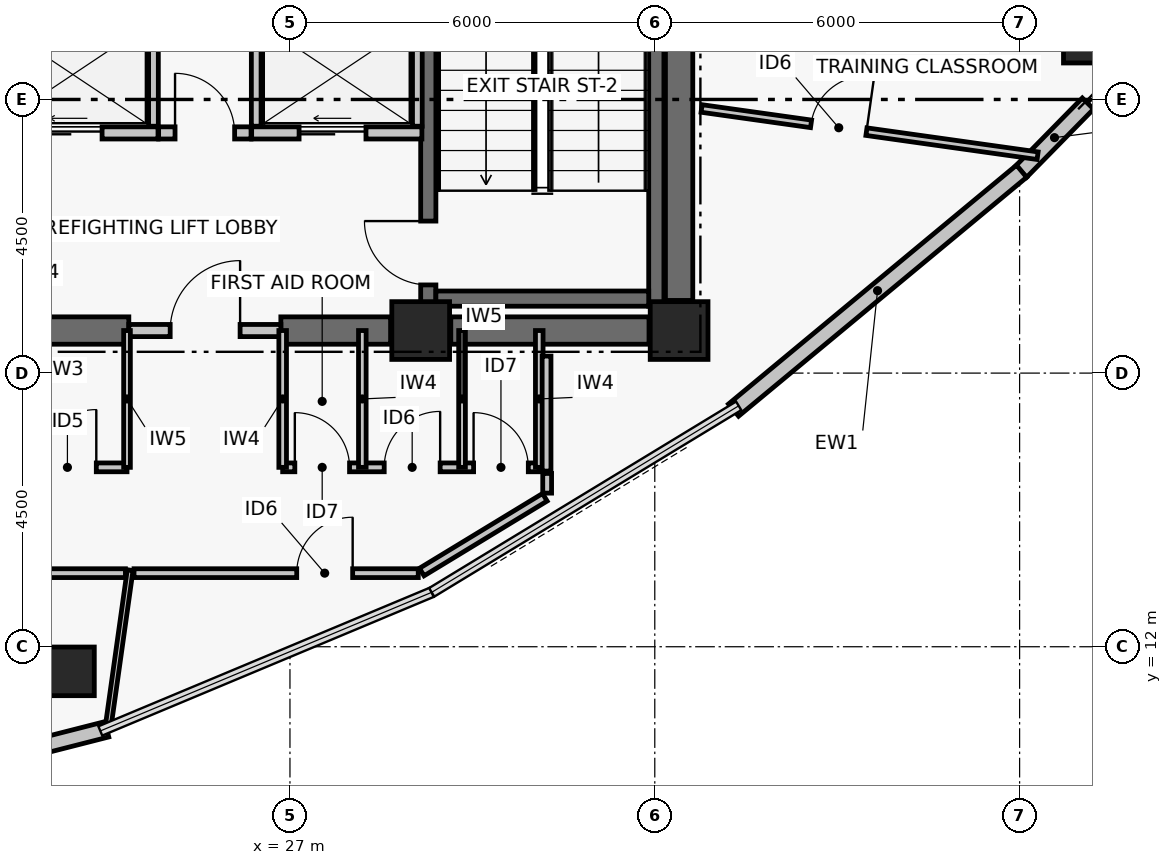
"""IFC4 building model, lengths in metres.
Left out: names, types, materials, properties, quantities, classifications, styles, units other than length and angle.
Written with IfcOpenShell. Run it as: python <this file> out.ifc"""

import sys

from ifc_helpers import new_model, si_unit, direction, frame, frame_2d, origin, origin_2d, place, context, subcontext, project, spatial, rectangle, hollow_rectangle, extrude, element, fill, save


model = new_model("IFC4")
c1 = context("Model", 3, precision=1e-05, world=origin(), true_north=direction((0.0, 1.0)))
c2 = subcontext(c1, "Body", "Model", "MODEL_VIEW")
j1 = project(units=[si_unit("LENGTHUNIT", "METRE"), si_unit("PLANEANGLEUNIT", "RADIAN")], contexts=[c1])
p1 = place(None, origin())
s1 = spatial("IfcSite", under=j1, at=p1, CompositionType="ELEMENT")
p2 = place(p1, origin())
s2 = spatial("IfcBuilding", under=s1, at=p2, CompositionType="ELEMENT")
p3 = place(p2, frame((0.0, 0.0, 284.34)))
s3 = spatial("IfcBuildingStorey", under=s2, at=p3, CompositionType="ELEMENT", Elevation=284.34)
for number, where, z_axis, x_axis in (
    (1, (29.15, 17.2, 0.0), (0.0, 0.0, 1.0), (1.0, 0.0, 0.0)),
    (2, (33.4, 17.2, 0.0), (0.0, 0.0, 1.0), (1.0, 0.0, 0.0)),
):
    element("IfcColumn", number, at=place(p3, frame(where, z_axis=z_axis, x_axis=x_axis)), inside=s3, PredefinedType="COLUMN", context=c2, shape_type="SweptSolid", body=[
        extrude(rectangle(XDim=0.95, YDim=0.95, at=origin_2d()), origin(), (0.0, 0.0, 1.0), 3.72),
    ])
p4 = place(p3, frame((22.545, 17.2, 0.0), z_axis=(0.0, 0.0, 1.0), x_axis=(1.0, 0.0, 0.0)))
e3 = element("IfcWall", 3, at=p4, inside=s3, PredefinedType="SHEAR", context=c2, shape_type="SweptSolid", body=[
    extrude(rectangle(XDim=1.805, YDim=0.45, at=frame_2d((0.903, 0.0))), origin(), (0.0, 0.0, 1.0), 3.5),
])
p5 = place(p3, frame((26.85, 17.2, 0.0), z_axis=(0.0, 0.0, 1.0), x_axis=(1.0, 0.0, 0.0)))
e4 = element("IfcWall", 4, at=p5, inside=s3, PredefinedType="SHEAR", context=c2, shape_type="SweptSolid", body=[
    extrude(rectangle(XDim=1.805, YDim=0.45, at=frame_2d((0.902, 0.0))), origin(), (0.0, 0.0, 1.0), 3.5),
])
p6 = place(p3, frame((29.645, 17.2, 0.0), z_axis=(0.0, 0.0, 1.0), x_axis=(1.0, 0.0, 0.0)))
e5 = element("IfcWall", 5, at=p6, inside=s3, PredefinedType="SHEAR", context=c2, shape_type="SweptSolid", body=[
    extrude(rectangle(XDim=3.26, YDim=0.45, at=frame_2d((1.63, 0.0))), origin(), (0.0, 0.0, 1.0), 3.5),
])
p7 = place(p3, frame((33.4, 17.695, 0.0), z_axis=(0.0, 0.0, 1.0), x_axis=(0.0, 1.0, 0.0)))
e6 = element("IfcWall", 6, at=p7, inside=s3, PredefinedType="SHEAR", context=c2, shape_type="SweptSolid", body=[
    extrude(rectangle(XDim=8.61, YDim=0.45, at=frame_2d((4.305, 0.0))), origin(), (0.0, 0.0, 1.0), 3.5),
])
p8 = place(p3, frame((29.275, 17.6, 0.0), z_axis=(0.0, 0.0, 1.0), x_axis=(0.0, 1.0, 0.0)))
e7 = element("IfcWall", 7, at=p8, inside=s3, PredefinedType="SHEAR", context=c2, shape_type="SweptSolid", body=[
    extrude(rectangle(XDim=8.8, YDim=0.25, at=frame_2d((4.4, 0.0))), origin(), (0.0, 0.0, 1.0), 3.5),
])
p9 = place(p8, frame((0.35, 0.0, 0.0)))
e8 = element("IfcOpeningElement", 8, at=p9, cuts=e7, PredefinedType="OPENING", context=c2, shape_type="SweptSolid", body=[
    extrude(rectangle(XDim=1.05, YDim=2.08, at=frame_2d((0.525, 1.04))), frame((0.0, 0.135, 0.0), z_axis=(0.0, -1.0, 0.0), x_axis=(1.0, 0.0, 0.0)), (0.0, 0.0, 1.0), 0.27),
])
p10 = place(p3, frame((33.025, 17.6, 0.0), z_axis=(0.0, 0.0, 1.0), x_axis=(0.0, 1.0, 0.0)))
e9 = element("IfcWall", 9, at=p10, inside=s3, PredefinedType="SHEAR", context=c2, shape_type="SweptSolid", body=[
    extrude(rectangle(XDim=8.8, YDim=0.25, at=frame_2d((4.4, 0.0))), origin(), (0.0, 0.0, 1.0), 3.5),
])
p11 = place(p3, frame((29.4, 17.725, 0.0), z_axis=(0.0, 0.0, 1.0), x_axis=(1.0, 0.0, 0.0)))
e10 = element("IfcWall", 10, at=p11, inside=s3, PredefinedType="SHEAR", context=c2, shape_type="SweptSolid", body=[
    extrude(rectangle(XDim=3.5, YDim=0.25, at=frame_2d((1.75, 0.0))), origin(), (0.0, 0.0, 1.0), 3.5),
])
for number, where, z_axis, x_axis in (
    (11, (40.122, 22.0, 0.0), (0.0, 0.0, 1.0), (1.0, 0.0, 0.0)),
    (12, (23.382, 11.595, 0.0), (0.0, 0.0, 1.0), (1.0, 0.0, 0.0)),
):
    element("IfcColumn", number, at=place(p3, frame(where, z_axis=z_axis, x_axis=x_axis)), inside=s3, PredefinedType="COLUMN", context=c2, shape_type="SweptSolid", body=[
        extrude(hollow_rectangle(XDim=0.8, YDim=0.8, WallThickness=0.035, at=origin_2d()), origin(), (0.0, 0.0, 1.0), 3.72),
    ])
p12 = place(p3, frame((40.124, 20.933, 0.0), z_axis=(0.0, 0.0, 1.0), x_axis=(-0.700470648387, -0.71368121087, 0.0)))
e13 = element("IfcWall", 13, at=p12, inside=s3, PredefinedType="PARTITIONING", context=c2, shape_type="SweptSolid", body=[
    extrude(rectangle(XDim=1.571, YDim=0.26, at=frame_2d((0.785, 0.0))), origin(), (0.0, 0.0, 1.0), 3.5),
])
p13 = place(p3, frame((23.988, 10.642, 0.0), z_axis=(0.0, 0.0, 1.0), x_axis=(-0.968988278672, -0.247106689096, 0.0)))
e14 = element("IfcWall", 14, at=p13, inside=s3, PredefinedType="PARTITIONING", context=c2, shape_type="SweptSolid", body=[
    extrude(rectangle(XDim=6.154, YDim=0.26, at=frame_2d((3.077, 0.0))), origin(), (0.0, 0.0, 1.0), 3.5),
])
p14 = place(p3, frame((39.032, 19.82, 0.0), z_axis=(0.0, 0.0, 1.0), x_axis=(-0.769779830138, -0.638309496337, 0.0)))
e15 = element("IfcWall", 15, at=p14, inside=s3, PredefinedType="PARTITIONING", context=c2, shape_type="SweptSolid", body=[
    extrude(rectangle(XDim=6.154, YDim=0.26, at=frame_2d((3.077, 0.0))), origin(), (0.0, 0.0, 1.0), 3.5),
])
p15 = place(p3, frame((24.35, 17.2, 0.0), z_axis=(0.0, 0.0, 1.0), x_axis=(1.0, 0.0, 0.0)))
e16 = element("IfcWall", 16, at=p15, inside=s3, PredefinedType="PARTITIONING", context=c2, shape_type="SweptSolid", body=[
    extrude(rectangle(XDim=2.5, YDim=0.2, at=frame_2d((1.25, 0.0))), origin(), (0.0, 0.0, 1.0), 2.63),
])
p16 = place(p15, frame((0.68, 0.0, 0.0)))
e17 = element("IfcOpeningElement", 17, at=p16, cuts=e16, PredefinedType="OPENING", context=c2, shape_type="SweptSolid", body=[
    extrude(rectangle(XDim=1.15, YDim=2.08, at=frame_2d((0.575, 1.04))), frame((0.0, 0.11, 0.0), z_axis=(0.0, -1.0, 0.0), x_axis=(1.0, 0.0, 0.0)), (0.0, 0.0, 1.0), 0.22),
])
p17 = place(p3, frame((24.84, 20.45, 0.0), z_axis=(0.0, 0.0, 1.0), x_axis=(1.0, 0.0, 0.0)))
e18 = element("IfcWall", 18, at=p17, inside=s3, PredefinedType="PARTITIONING", context=c2, shape_type="SweptSolid", body=[
    extrude(rectangle(XDim=1.52, YDim=0.2, at=frame_2d((0.76, 0.0))), origin(), (0.0, 0.0, 1.0), 3.5),
])
p18 = place(p17, frame((0.27, 0.0, 0.0)))
e19 = element("IfcOpeningElement", 19, at=p18, cuts=e18, PredefinedType="OPENING", context=c2, shape_type="SweptSolid", body=[
    extrude(rectangle(XDim=0.98, YDim=2.06, at=frame_2d((0.49, 1.03))), frame((0.0, 0.11, 0.0), z_axis=(0.0, -1.0, 0.0), x_axis=(1.0, 0.0, 0.0)), (0.0, 0.0, 1.0), 0.22),
])
p19 = place(p3, frame((22.03, 20.45, 0.0), z_axis=(0.0, 0.0, 1.0), x_axis=(1.0, 0.0, 0.0)))
e20 = element("IfcWall", 20, at=p19, inside=s3, PredefinedType="PARTITIONING", context=c2, shape_type="SweptSolid", body=[
    extrude(rectangle(XDim=2.8, YDim=0.2, at=frame_2d((1.4, 0.0))), origin(), (0.0, 0.0, 1.0), 3.5),
])
p20 = place(p19, frame((0.78, 0.0, 0.0)))
e21 = element("IfcOpeningElement", 21, at=p20, cuts=e20, PredefinedType="OPENING", context=c2, shape_type="SweptSolid", body=[
    extrude(rectangle(XDim=1.1, YDim=2.08, at=frame_2d((0.55, 1.04))), frame((0.0, 0.11, 0.0), z_axis=(0.0, -1.0, 0.0), x_axis=(1.0, 0.0, 0.0)), (0.0, 0.0, 1.0), 0.22),
])
p21 = place(p3, frame((26.37, 20.45, 0.0), z_axis=(0.0, 0.0, 1.0), x_axis=(1.0, 0.0, 0.0)))
e22 = element("IfcWall", 22, at=p21, inside=s3, PredefinedType="PARTITIONING", context=c2, shape_type="SweptSolid", body=[
    extrude(rectangle(XDim=2.8, YDim=0.2, at=frame_2d((1.4, 0.0))), origin(), (0.0, 0.0, 1.0), 3.5),
])
p22 = place(p21, frame((0.78, 0.0, 0.0)))
e23 = element("IfcOpeningElement", 23, at=p22, cuts=e22, PredefinedType="OPENING", context=c2, shape_type="SweptSolid", body=[
    extrude(rectangle(XDim=1.1, YDim=2.08, at=frame_2d((0.55, 1.04))), frame((0.0, 0.11, 0.0), z_axis=(0.0, -1.0, 0.0), x_axis=(1.0, 0.0, 0.0)), (0.0, 0.0, 1.0), 0.22),
])
p23 = place(p3, frame((24.755, 20.56, 0.0), z_axis=(0.0, 0.0, 1.0), x_axis=(0.0, 1.0, 0.0)))
e24 = element("IfcWall", 24, at=p23, inside=s3, PredefinedType="PARTITIONING", context=c2, shape_type="SweptSolid", body=[
    extrude(rectangle(XDim=1.71, YDim=0.16, at=frame_2d((0.855, 0.0))), origin(), (0.0, 0.0, 1.0), 3.5),
])
p24 = place(p3, frame((29.095, 20.56, 0.0), z_axis=(0.0, 0.0, 1.0), x_axis=(0.0, 1.0, 0.0)))
e25 = element("IfcWall", 25, at=p24, inside=s3, PredefinedType="PARTITIONING", context=c2, shape_type="SweptSolid", body=[
    extrude(rectangle(XDim=3.58, YDim=0.16, at=frame_2d((1.79, 0.0))), origin(), (0.0, 0.0, 1.0), 3.5),
])
p25 = place(p3, frame((26.445, 20.56, 0.0), z_axis=(0.0, 0.0, 1.0), x_axis=(0.0, 1.0, 0.0)))
e26 = element("IfcWall", 26, at=p25, inside=s3, PredefinedType="PARTITIONING", context=c2, shape_type="SweptSolid", body=[
    extrude(rectangle(XDim=1.71, YDim=0.16, at=frame_2d((0.855, 0.0))), origin(), (0.0, 0.0, 1.0), 3.5),
])
p26 = place(p3, frame((19.1, 14.95, 0.0), z_axis=(0.0, 0.0, 1.0), x_axis=(1.0, 0.0, 0.0)))
e27 = element("IfcWall", 27, at=p26, inside=s3, PredefinedType="PARTITIONING", context=c2, shape_type="SweptSolid", body=[
    extrude(rectangle(XDim=5.22, YDim=0.145, at=frame_2d((2.61, 0.0))), origin(), (0.0, 0.0, 1.0), 2.83),
])
p27 = place(p26, frame((0.2, 0.0, 0.0)))
e28 = element("IfcOpeningElement", 28, at=p27, cuts=e27, PredefinedType="OPENING", context=c2, shape_type="SweptSolid", body=[
    extrude(rectangle(XDim=0.9, YDim=2.02, at=frame_2d((0.45, 1.01))), frame((0.0, 0.083, 0.0), z_axis=(0.0, -1.0, 0.0), x_axis=(1.0, 0.0, 0.0)), (0.0, 0.0, 1.0), 0.165),
])
p28 = place(p26, frame((1.805, 0.0, 0.0)))
e29 = element("IfcOpeningElement", 29, at=p28, cuts=e27, PredefinedType="OPENING", context=c2, shape_type="SweptSolid", body=[
    extrude(rectangle(XDim=0.95, YDim=2.06, at=frame_2d((0.475, 1.03))), frame((0.0, 0.083, 0.0), z_axis=(0.0, -1.0, 0.0), x_axis=(1.0, 0.0, 0.0)), (0.0, 0.0, 1.0), 0.165),
])
p29 = place(p26, frame((3.765, 0.0, 0.0)))
e30 = element("IfcOpeningElement", 30, at=p29, cuts=e27, PredefinedType="OPENING", context=c2, shape_type="SweptSolid", body=[
    extrude(rectangle(XDim=0.95, YDim=2.06, at=frame_2d((0.475, 1.03))), frame((0.0, 0.083, 0.0), z_axis=(0.0, -1.0, 0.0), x_axis=(1.0, 0.0, 0.0)), (0.0, 0.0, 1.0), 0.165),
])
p30 = place(p3, frame((26.88, 14.95, 0.0), z_axis=(0.0, 0.0, 1.0), x_axis=(1.0, 0.0, 0.0)))
e31 = element("IfcWall", 31, at=p30, inside=s3, PredefinedType="PARTITIONING", context=c2, shape_type="SweptSolid", body=[
    extrude(rectangle(XDim=4.22, YDim=0.145, at=frame_2d((2.11, 0.0))), origin(), (0.0, 0.0, 1.0), 2.98),
])
p31 = place(p30, frame((0.2, 0.0, 0.0)))
e32 = element("IfcOpeningElement", 32, at=p31, cuts=e31, PredefinedType="OPENING", context=c2, shape_type="SweptSolid", body=[
    extrude(rectangle(XDim=0.9, YDim=2.02, at=frame_2d((0.45, 1.01))), frame((0.0, 0.083, 0.0), z_axis=(0.0, -1.0, 0.0), x_axis=(1.0, 0.0, 0.0)), (0.0, 0.0, 1.0), 0.165),
])
p32 = place(p30, frame((1.67, 0.0, 0.0)))
e33 = element("IfcOpeningElement", 33, at=p32, cuts=e31, PredefinedType="OPENING", context=c2, shape_type="SweptSolid", body=[
    extrude(rectangle(XDim=0.92, YDim=2.05, at=frame_2d((0.46, 1.025))), frame((0.0, 0.083, 0.0), z_axis=(0.0, -1.0, 0.0), x_axis=(1.0, 0.0, 0.0)), (0.0, 0.0, 1.0), 0.165),
])
p33 = place(p30, frame((3.14, 0.0, 0.0)))
e34 = element("IfcOpeningElement", 34, at=p33, cuts=e31, PredefinedType="OPENING", context=c2, shape_type="SweptSolid", body=[
    extrude(rectangle(XDim=0.9, YDim=2.02, at=frame_2d((0.45, 1.01))), frame((0.0, 0.083, 0.0), z_axis=(0.0, -1.0, 0.0), x_axis=(1.0, 0.0, 0.0)), (0.0, 0.0, 1.0), 0.165),
])
p34 = place(p3, frame((24.32, 14.95, 0.0), z_axis=(0.0, 0.0, 1.0), x_axis=(0.0, 1.0, 0.0)))
e35 = element("IfcWall", 35, at=p34, inside=s3, PredefinedType="PARTITIONING", context=c2, shape_type="SweptSolid", body=[
    extrude(rectangle(XDim=2.25, YDim=0.11, at=frame_2d((1.125, 0.0))), origin(), (0.0, 0.0, 1.0), 2.63),
])
for number, where, z_axis, x_axis in (
    (36, (26.88, 14.95, 0.0), (0.0, 0.0, 1.0), (0.0, 1.0, 0.0)),
    (37, (28.19, 14.95, 0.0), (0.0, 0.0, 1.0), (0.0, 1.0, 0.0)),
):
    element("IfcWall", number, at=place(p3, frame(where, z_axis=z_axis, x_axis=x_axis)), inside=s3, PredefinedType="PARTITIONING", context=c2, shape_type="SweptSolid", body=[
        extrude(rectangle(XDim=2.25, YDim=0.125, at=frame_2d((1.125, 0.0))), origin(), (0.0, 0.0, 1.0), 2.63),
    ])
p35 = place(p3, frame((29.83, 14.95, 0.0), z_axis=(0.0, 0.0, 1.0), x_axis=(0.0, 1.0, 0.0)))
e38 = element("IfcWall", 38, at=p35, inside=s3, PredefinedType="PARTITIONING", context=c2, shape_type="SweptSolid", body=[
    extrude(rectangle(XDim=2.25, YDim=0.11, at=frame_2d((1.125, 0.0))), origin(), (0.0, 0.0, 1.0), 2.63),
])
p36 = place(p3, frame((31.1, 14.95, 0.0), z_axis=(0.0, 0.0, 1.0), x_axis=(0.0, 1.0, 0.0)))
e39 = element("IfcWall", 39, at=p36, inside=s3, PredefinedType="PARTITIONING", context=c2, shape_type="SweptSolid", body=[
    extrude(rectangle(XDim=2.25, YDim=0.125, at=frame_2d((1.125, 0.0))), origin(), (0.0, 0.0, 1.0), 2.63),
])
p37 = place(p3, frame((17.54, 13.21, 0.0), z_axis=(0.0, 0.0, 1.0), x_axis=(1.0, 0.0, 0.0)))
e40 = element("IfcWall", 40, at=p37, inside=s3, PredefinedType="PARTITIONING", context=c2, shape_type="SweptSolid", body=[
    extrude(rectangle(XDim=6.754, YDim=0.145, at=frame_2d((3.377, 0.0))), origin(), (0.0, 0.0, 1.0), 2.83),
])
p38 = place(p37, frame((0.936, 0.0, 0.0)))
e41 = element("IfcOpeningElement", 41, at=p38, cuts=e40, PredefinedType="OPENING", context=c2, shape_type="SweptSolid", body=[
    extrude(rectangle(XDim=0.95, YDim=2.06, at=frame_2d((0.475, 1.03))), frame((0.0, 0.083, 0.0), z_axis=(0.0, -1.0, 0.0), x_axis=(1.0, 0.0, 0.0)), (0.0, 0.0, 1.0), 0.165),
])
p39 = place(p3, frame((24.435, 13.21, 0.0), z_axis=(0.0, 0.0, 1.0), x_axis=(1.0, 0.0, 0.0)))
e42 = element("IfcWall", 42, at=p39, inside=s3, PredefinedType="PARTITIONING", context=c2, shape_type="SweptSolid", body=[
    extrude(rectangle(XDim=4.675, YDim=0.145, at=frame_2d((2.337, 0.0))), origin(), (0.0, 0.0, 1.0), 2.98),
])
p40 = place(p39, frame((2.676, 0.0, 0.0)))
e43 = element("IfcOpeningElement", 43, at=p40, cuts=e42, PredefinedType="OPENING", context=c2, shape_type="SweptSolid", body=[
    extrude(rectangle(XDim=0.92, YDim=2.05, at=frame_2d((0.46, 1.025))), frame((0.0, 0.083, 0.0), z_axis=(0.0, -1.0, 0.0), x_axis=(1.0, 0.0, 0.0)), (0.0, 0.0, 1.0), 0.165),
])
p41 = place(p3, frame((29.168, 13.229, 0.0), z_axis=(0.0, 0.0, 1.0), x_axis=(0.854678044033, 0.519158396876, 0.0)))
e44 = element("IfcWall", 44, at=p41, inside=s3, PredefinedType="PARTITIONING", context=c2, shape_type="SweptSolid", body=[
    extrude(rectangle(XDim=2.368, YDim=0.145, at=frame_2d((1.184, 0.0))), origin(), (0.0, 0.0, 1.0), 3.5),
])
p42 = place(p3, frame((31.23, 14.526, 0.0), z_axis=(0.0, 0.0, 1.0), x_axis=(0.0, 1.0, 0.0)))
e45 = element("IfcWall", 45, at=p42, inside=s3, PredefinedType="PARTITIONING", context=c2, shape_type="SweptSolid", body=[
    extrude(rectangle(XDim=0.324, YDim=0.145, at=frame_2d((0.162, 0.0))), origin(), (0.0, 0.0, 1.0), 3.5),
])
p43 = place(p3, frame((31.22, 14.889, 0.0), z_axis=(0.0, 0.0, 1.0), x_axis=(0.0, 1.0, 0.0)))
e46 = element("IfcWall", 46, at=p43, inside=s3, PredefinedType="PARTITIONING", context=c2, shape_type="SweptSolid", body=[
    extrude(rectangle(XDim=1.891, YDim=0.145, at=frame_2d((0.946, 0.0))), origin(), (0.0, 0.0, 1.0), 2.63),
])
p44 = place(p3, frame((24.372, 13.26, 0.0), z_axis=(0.0, 0.0, 1.0), x_axis=(-0.139185119823, -0.990266379526, 0.0)))
e47 = element("IfcWall", 47, at=p44, inside=s3, PredefinedType="PARTITIONING", context=c2, shape_type="SweptSolid", body=[
    extrude(rectangle(XDim=2.629, YDim=0.095, at=frame_2d((1.315, 0.0))), origin(), (0.0, 0.0, 1.0), 2.98),
])
p45 = place(p3, frame((33.77, 20.852, 0.0), z_axis=(0.0, 0.0, 1.0), x_axis=(0.990268923666, -0.139167017724, 0.0)))
e48 = element("IfcWall", 48, at=p45, inside=s3, PredefinedType="PARTITIONING", context=c2, shape_type="SweptSolid", body=[
    extrude(rectangle(XDim=5.58, YDim=0.125, at=frame_2d((2.79, 0.0))), origin(), (0.0, 0.0, 1.0), 2.63),
])
p46 = place(p45, frame((1.818, 0.0, 0.0)))
e49 = element("IfcOpeningElement", 49, at=p46, cuts=e48, PredefinedType="OPENING", context=c2, shape_type="SweptSolid", body=[
    extrude(rectangle(XDim=0.92, YDim=2.05, at=frame_2d((0.46, 1.025))), frame((0.0, 0.073, 0.0), z_axis=(0.0, -1.0, 0.0), x_axis=(1.0, 0.0, 0.0)), (0.0, 0.0, 1.0), 0.145),
])
p47 = place(p9, origin())
e50 = element("IfcDoor", 50, at=p47, inside=s3, OperationType="SINGLE_SWING_RIGHT", PredefinedType="DOOR", context=c2, shape_type="SweptSolid", body=[
    extrude(rectangle(XDim=1.05, YDim=2.08, at=frame_2d((0.525, 1.04))), frame((0.0, 0.025, 0.0), z_axis=(0.0, -1.0, 0.0), x_axis=(1.0, 0.0, 0.0)), (0.0, 0.0, 1.0), 0.05),
])
fill(e8, e50)
p48 = place(p16, origin())
e51 = element("IfcDoor", 51, at=p48, inside=s3, OperationType="SINGLE_SWING_RIGHT", PredefinedType="DOOR", context=c2, shape_type="SweptSolid", body=[
    extrude(rectangle(XDim=1.15, YDim=2.08, at=frame_2d((0.575, 1.04))), frame((0.0, 0.025, 0.0), z_axis=(0.0, -1.0, 0.0), x_axis=(1.0, 0.0, 0.0)), (0.0, 0.0, 1.0), 0.05),
])
fill(e17, e51)
p49 = place(p18, origin())
e52 = element("IfcDoor", 52, at=p49, inside=s3, OperationType="SINGLE_SWING_LEFT", PredefinedType="DOOR", context=c2, shape_type="SweptSolid", body=[
    extrude(rectangle(XDim=0.98, YDim=2.06, at=frame_2d((0.49, 1.03))), frame((0.0, 0.025, 0.0), z_axis=(0.0, -1.0, 0.0), x_axis=(1.0, 0.0, 0.0)), (0.0, 0.0, 1.0), 0.05),
])
fill(e19, e52)
p50 = place(p20, origin())
e53 = element("IfcDoor", 53, at=p50, inside=s3, OperationType="DOUBLE_DOOR_SLIDING", PredefinedType="DOOR", context=c2, shape_type="SweptSolid", body=[
    extrude(rectangle(XDim=1.1, YDim=2.08, at=frame_2d((0.55, 1.04))), frame((0.0, 0.025, 0.0), z_axis=(0.0, -1.0, 0.0), x_axis=(1.0, 0.0, 0.0)), (0.0, 0.0, 1.0), 0.05),
])
fill(e21, e53)
p51 = place(p22, origin())
e54 = element("IfcDoor", 54, at=p51, inside=s3, OperationType="DOUBLE_DOOR_SLIDING", PredefinedType="DOOR", context=c2, shape_type="SweptSolid", body=[
    extrude(rectangle(XDim=1.1, YDim=2.08, at=frame_2d((0.55, 1.04))), frame((0.0, 0.025, 0.0), z_axis=(0.0, -1.0, 0.0), x_axis=(1.0, 0.0, 0.0)), (0.0, 0.0, 1.0), 0.05),
])
fill(e23, e54)
p52 = place(p29, origin())
e55 = element("IfcDoor", 55, at=p52, inside=s3, OperationType="SINGLE_SWING_RIGHT", PredefinedType="DOOR", context=c2, shape_type="SweptSolid", body=[
    extrude(rectangle(XDim=0.95, YDim=2.06, at=frame_2d((0.475, 1.03))), frame((0.0, 0.025, 0.0), z_axis=(0.0, -1.0, 0.0), x_axis=(1.0, 0.0, 0.0)), (0.0, 0.0, 1.0), 0.05),
])
fill(e30, e55)
p53 = place(p31, origin())
e56 = element("IfcDoor", 56, at=p53, inside=s3, OperationType="SINGLE_SWING_LEFT", PredefinedType="DOOR", context=c2, shape_type="SweptSolid", body=[
    extrude(rectangle(XDim=0.9, YDim=2.02, at=frame_2d((0.45, 1.01))), frame((0.0, 0.025, 0.0), z_axis=(0.0, -1.0, 0.0), x_axis=(1.0, 0.0, 0.0)), (0.0, 0.0, 1.0), 0.05),
])
fill(e32, e56)
p54 = place(p32, origin())
e57 = element("IfcDoor", 57, at=p54, inside=s3, OperationType="SINGLE_SWING_RIGHT", PredefinedType="DOOR", context=c2, shape_type="SweptSolid", body=[
    extrude(rectangle(XDim=0.92, YDim=2.05, at=frame_2d((0.46, 1.025))), frame((0.0, 0.025, 0.0), z_axis=(0.0, -1.0, 0.0), x_axis=(1.0, 0.0, 0.0)), (0.0, 0.0, 1.0), 0.05),
])
fill(e33, e57)
p55 = place(p33, origin())
e58 = element("IfcDoor", 58, at=p55, inside=s3, OperationType="SINGLE_SWING_LEFT", PredefinedType="DOOR", context=c2, shape_type="SweptSolid", body=[
    extrude(rectangle(XDim=0.9, YDim=2.02, at=frame_2d((0.45, 1.01))), frame((0.0, 0.025, 0.0), z_axis=(0.0, -1.0, 0.0), x_axis=(1.0, 0.0, 0.0)), (0.0, 0.0, 1.0), 0.05),
])
fill(e34, e58)
p56 = place(p40, origin())
e59 = element("IfcDoor", 59, at=p56, inside=s3, OperationType="SINGLE_SWING_RIGHT", PredefinedType="DOOR", context=c2, shape_type="SweptSolid", body=[
    extrude(rectangle(XDim=0.92, YDim=2.05, at=frame_2d((0.46, 1.025))), frame((0.0, 0.025, 0.0), z_axis=(0.0, -1.0, 0.0), x_axis=(1.0, 0.0, 0.0)), (0.0, 0.0, 1.0), 0.05),
])
fill(e43, e59)
p57 = place(p46, origin())
e60 = element("IfcDoor", 60, at=p57, inside=s3, OperationType="SINGLE_SWING_RIGHT", PredefinedType="DOOR", context=c2, shape_type="SweptSolid", body=[
    extrude(rectangle(XDim=0.92, YDim=2.05, at=frame_2d((0.46, 1.025))), frame((0.0, 0.025, 0.0), z_axis=(0.0, -1.0, 0.0), x_axis=(1.0, 0.0, 0.0)), (0.0, 0.0, 1.0), 0.05),
])
fill(e49, e60)
save(model, sys.argv[1])
